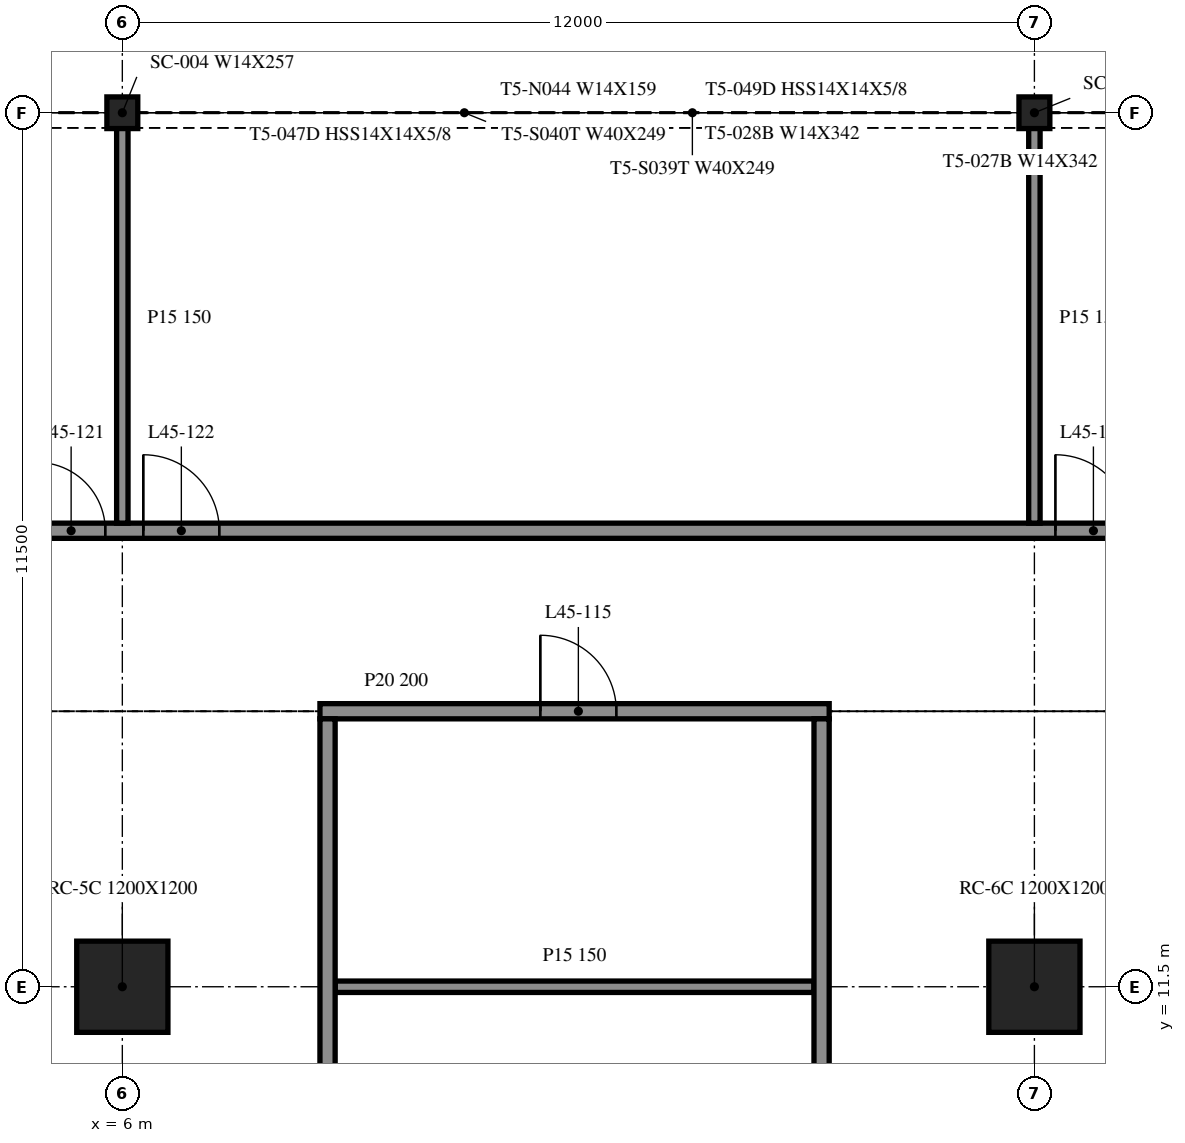
"""IFC4 building model, lengths in metres.
Left out: names, types, materials, properties, quantities, classifications, styles, units other than length and angle.
Written with IfcOpenShell. Run it as: python <this file> out.ifc"""

import sys

from ifc_helpers import new_model, si_unit, direction, frame, frame_2d, origin, origin_2d, place, context, subcontext, project, spatial, rectangle, i_section, extrude, element, fill, save


model = new_model("IFC4")
c1 = context("Model", 3, precision=1e-05, world=origin(), true_north=direction((0.0, 1.0)))
c2 = subcontext(c1, "Body", "Model", "MODEL_VIEW")
j1 = project(units=[si_unit("LENGTHUNIT", "METRE"), si_unit("PLANEANGLEUNIT", "RADIAN")], contexts=[c1])
p1 = place(None, origin())
s1 = spatial("IfcSite", under=j1, at=p1, CompositionType="ELEMENT")
p2 = place(p1, origin())
s2 = spatial("IfcBuilding", under=s1, at=p2, CompositionType="ELEMENT")
p3 = place(p2, frame((0.0, 0.0, 189.6)))
s3 = spatial("IfcBuildingStorey", under=s2, at=p3, CompositionType="ELEMENT", Elevation=189.6)
for number, where, z_axis, x_axis in (
    (1, (6.0, 11.5, -0.4), (0.0, 0.0, 1.0), (1.0, 0.0, 0.0)),
    (2, (18.0, 11.5, -0.4), (0.0, 0.0, 1.0), (1.0, 0.0, 0.0)),
):
    element("IfcColumn", number, at=place(p3, frame(where, z_axis=z_axis, x_axis=x_axis)), inside=s3, PredefinedType="COLUMN", context=c2, shape_type="SweptSolid", body=[
        extrude(rectangle(XDim=1.2, YDim=1.2, at=origin_2d()), origin(), (0.0, 0.0, 1.0), 4.36),
    ])
for number, where, z_axis, x_axis in (
    (3, (18.0, 23.0, -0.4), (0.0, 0.0, 1.0), (1.0, 0.0, 0.0)),
    (4, (6.0, 23.0, -0.4), (0.0, 0.0, 1.0), (1.0, 0.0, 0.0)),
):
    element("IfcColumn", number, at=place(p3, frame(where, z_axis=z_axis, x_axis=x_axis)), inside=s3, PredefinedType="COLUMN", context=c2, shape_type="SweptSolid", body=[
        extrude(i_section(OverallWidth=0.406, OverallDepth=0.417, WebThickness=0.03, FlangeThickness=0.048, at=origin_2d()), origin(), (0.0, 0.0, 1.0), 4.36),
    ])
p4 = place(p3, frame((8.8, 11.5, 0.0), z_axis=(0.0, 0.0, 1.0), x_axis=(1.0, 0.0, 0.0)))
e5 = element("IfcWall", 5, at=p4, inside=s3, PredefinedType="PARTITIONING", context=c2, shape_type="SweptSolid", body=[
    extrude(rectangle(XDim=6.3, YDim=0.15, at=frame_2d((3.15, 0.0))), origin(), (0.0, 0.0, 1.0), 3.96),
])
p5 = place(p3, frame((8.6, 15.125, 0.0), z_axis=(0.0, 0.0, 1.0), x_axis=(1.0, 0.0, 0.0)))
e6 = element("IfcWall", 6, at=p5, inside=s3, PredefinedType="PARTITIONING", context=c2, shape_type="SweptSolid", body=[
    extrude(rectangle(XDim=6.7, YDim=0.2, at=frame_2d((3.35, 0.0))), origin(), (0.0, 0.0, 1.0), 3.96),
])
p6 = place(p5, frame((2.9, 0.0, 0.0)))
e7 = element("IfcOpeningElement", 7, at=p6, cuts=e6, PredefinedType="OPENING", context=c2, shape_type="SweptSolid", body=[
    extrude(rectangle(XDim=1.0, YDim=2.1, at=frame_2d((0.5, 1.05))), frame((0.0, 0.11, 0.0), z_axis=(0.0, -1.0, 0.0), x_axis=(1.0, 0.0, 0.0)), (0.0, 0.0, 1.0), 0.22),
])
p7 = place(p3, frame((-40.624, 17.5, 0.0), z_axis=(0.0, 0.0, 1.0), x_axis=(1.0, 0.0, 0.0)))
e8 = element("IfcWall", 8, at=p7, inside=s3, PredefinedType="PARTITIONING", context=c2, shape_type="SweptSolid", body=[
    extrude(rectangle(XDim=94.524, YDim=0.2, at=frame_2d((47.262, 0.0))), origin(), (0.0, 0.0, 1.0), 3.96),
])
p8 = place(p7, frame((9.1, 0.0, 0.0)))
e9 = element("IfcOpeningElement", 9, at=p8, cuts=e8, PredefinedType="OPENING", context=c2, shape_type="SweptSolid", body=[
    extrude(rectangle(XDim=1.2, YDim=2.1, at=frame_2d((0.6, 1.05))), frame((0.0, 0.11, 0.0), z_axis=(0.0, -1.0, 0.0), x_axis=(1.0, 0.0, 0.0)), (0.0, 0.0, 1.0), 0.22),
])
p9 = place(p7, frame((21.1, 0.0, 0.0)))
e10 = element("IfcOpeningElement", 10, at=p9, cuts=e8, PredefinedType="OPENING", context=c2, shape_type="SweptSolid", body=[
    extrude(rectangle(XDim=1.2, YDim=2.1, at=frame_2d((0.6, 1.05))), frame((0.0, 0.11, 0.0), z_axis=(0.0, -1.0, 0.0), x_axis=(1.0, 0.0, 0.0)), (0.0, 0.0, 1.0), 0.22),
])
p10 = place(p7, frame((33.3, 0.0, 0.0)))
e11 = element("IfcOpeningElement", 11, at=p10, cuts=e8, PredefinedType="OPENING", context=c2, shape_type="SweptSolid", body=[
    extrude(rectangle(XDim=1.0, YDim=2.1, at=frame_2d((0.5, 1.05))), frame((0.0, 0.11, 0.0), z_axis=(0.0, -1.0, 0.0), x_axis=(1.0, 0.0, 0.0)), (0.0, 0.0, 1.0), 0.22),
])
p11 = place(p7, frame((45.5, 0.0, 0.0)))
e12 = element("IfcOpeningElement", 12, at=p11, cuts=e8, PredefinedType="OPENING", context=c2, shape_type="SweptSolid", body=[
    extrude(rectangle(XDim=0.9, YDim=2.1, at=frame_2d((0.45, 1.05))), frame((0.0, 0.11, 0.0), z_axis=(0.0, -1.0, 0.0), x_axis=(1.0, 0.0, 0.0)), (0.0, 0.0, 1.0), 0.22),
])
p12 = place(p7, frame((46.9, 0.0, 0.0)))
e13 = element("IfcOpeningElement", 13, at=p12, cuts=e8, PredefinedType="OPENING", context=c2, shape_type="SweptSolid", body=[
    extrude(rectangle(XDim=1.0, YDim=2.1, at=frame_2d((0.5, 1.05))), frame((0.0, 0.11, 0.0), z_axis=(0.0, -1.0, 0.0), x_axis=(1.0, 0.0, 0.0)), (0.0, 0.0, 1.0), 0.22),
])
p13 = place(p7, frame((58.9, 0.0, 0.0)))
e14 = element("IfcOpeningElement", 14, at=p13, cuts=e8, PredefinedType="OPENING", context=c2, shape_type="SweptSolid", body=[
    extrude(rectangle(XDim=1.0, YDim=2.1, at=frame_2d((0.5, 1.05))), frame((0.0, 0.11, 0.0), z_axis=(0.0, -1.0, 0.0), x_axis=(1.0, 0.0, 0.0)), (0.0, 0.0, 1.0), 0.22),
])
p14 = place(p7, frame((70.9, 0.0, 0.0)))
e15 = element("IfcOpeningElement", 15, at=p14, cuts=e8, PredefinedType="OPENING", context=c2, shape_type="SweptSolid", body=[
    extrude(rectangle(XDim=1.2, YDim=2.1, at=frame_2d((0.6, 1.05))), frame((0.0, 0.11, 0.0), z_axis=(0.0, -1.0, 0.0), x_axis=(1.0, 0.0, 0.0)), (0.0, 0.0, 1.0), 0.22),
])
p15 = place(p7, frame((82.9, 0.0, 0.0)))
e16 = element("IfcOpeningElement", 16, at=p15, cuts=e8, PredefinedType="OPENING", context=c2, shape_type="SweptSolid", body=[
    extrude(rectangle(XDim=1.2, YDim=2.1, at=frame_2d((0.6, 1.05))), frame((0.0, 0.11, 0.0), z_axis=(0.0, -1.0, 0.0), x_axis=(1.0, 0.0, 0.0)), (0.0, 0.0, 1.0), 0.22),
])
p16 = place(p3, frame((6.0, 17.6, 0.0), z_axis=(0.0, 0.0, 1.0), x_axis=(0.0, 1.0, 0.0)))
e17 = element("IfcWall", 17, at=p16, inside=s3, PredefinedType="PARTITIONING", context=c2, shape_type="SweptSolid", body=[
    extrude(rectangle(XDim=5.4, YDim=0.15, at=frame_2d((2.7, 0.0))), origin(), (0.0, 0.0, 1.0), 3.96),
])
for number, where, z_axis, x_axis in (
    (18, (8.7, -9.025, 0.0), (0.0, 0.0, 1.0), (0.0, 1.0, 0.0)),
    (19, (15.2, -9.025, 0.0), (0.0, 0.0, 1.0), (0.0, 1.0, 0.0)),
):
    element("IfcWall", number, at=place(p3, frame(where, z_axis=z_axis, x_axis=x_axis)), inside=s3, PredefinedType="PARTITIONING", context=c2, shape_type="SweptSolid", body=[
        extrude(rectangle(XDim=24.05, YDim=0.2, at=frame_2d((12.025, 0.0))), origin(), (0.0, 0.0, 1.0), 3.96),
    ])
p17 = place(p3, frame((18.0, 17.6, 0.0), z_axis=(0.0, 0.0, 1.0), x_axis=(0.0, 1.0, 0.0)))
e20 = element("IfcWall", 20, at=p17, inside=s3, PredefinedType="PARTITIONING", context=c2, shape_type="SweptSolid", body=[
    extrude(rectangle(XDim=5.4, YDim=0.15, at=frame_2d((2.7, 0.0))), origin(), (0.0, 0.0, 1.0), 3.96),
])
p18 = place(p6, origin())
e21 = element("IfcDoor", 21, at=p18, inside=s3, OperationType="SINGLE_SWING_LEFT", PredefinedType="DOOR", context=c2, shape_type="SweptSolid", body=[
    extrude(rectangle(XDim=1.0, YDim=2.1, at=frame_2d((0.5, 1.05))), frame((0.0, 0.025, 0.0), z_axis=(0.0, -1.0, 0.0), x_axis=(1.0, 0.0, 0.0)), (0.0, 0.0, 1.0), 0.05),
])
fill(e7, e21)
p19 = place(p11, origin())
e22 = element("IfcDoor", 22, at=p19, inside=s3, OperationType="SINGLE_SWING_LEFT", PredefinedType="DOOR", context=c2, shape_type="SweptSolid", body=[
    extrude(rectangle(XDim=0.9, YDim=2.1, at=frame_2d((0.45, 1.05))), frame((0.0, 0.025, 0.0), z_axis=(0.0, -1.0, 0.0), x_axis=(1.0, 0.0, 0.0)), (0.0, 0.0, 1.0), 0.05),
])
fill(e12, e22)
p20 = place(p12, origin())
e23 = element("IfcDoor", 23, at=p20, inside=s3, OperationType="SINGLE_SWING_RIGHT", PredefinedType="DOOR", context=c2, shape_type="SweptSolid", body=[
    extrude(rectangle(XDim=1.0, YDim=2.1, at=frame_2d((0.5, 1.05))), frame((0.0, 0.025, 0.0), z_axis=(0.0, -1.0, 0.0), x_axis=(1.0, 0.0, 0.0)), (0.0, 0.0, 1.0), 0.05),
])
fill(e13, e23)
p21 = place(p13, origin())
e24 = element("IfcDoor", 24, at=p21, inside=s3, OperationType="SINGLE_SWING_RIGHT", PredefinedType="DOOR", context=c2, shape_type="SweptSolid", body=[
    extrude(rectangle(XDim=1.0, YDim=2.1, at=frame_2d((0.5, 1.05))), frame((0.0, 0.025, 0.0), z_axis=(0.0, -1.0, 0.0), x_axis=(1.0, 0.0, 0.0)), (0.0, 0.0, 1.0), 0.05),
])
fill(e14, e24)
save(model, sys.argv[1])
